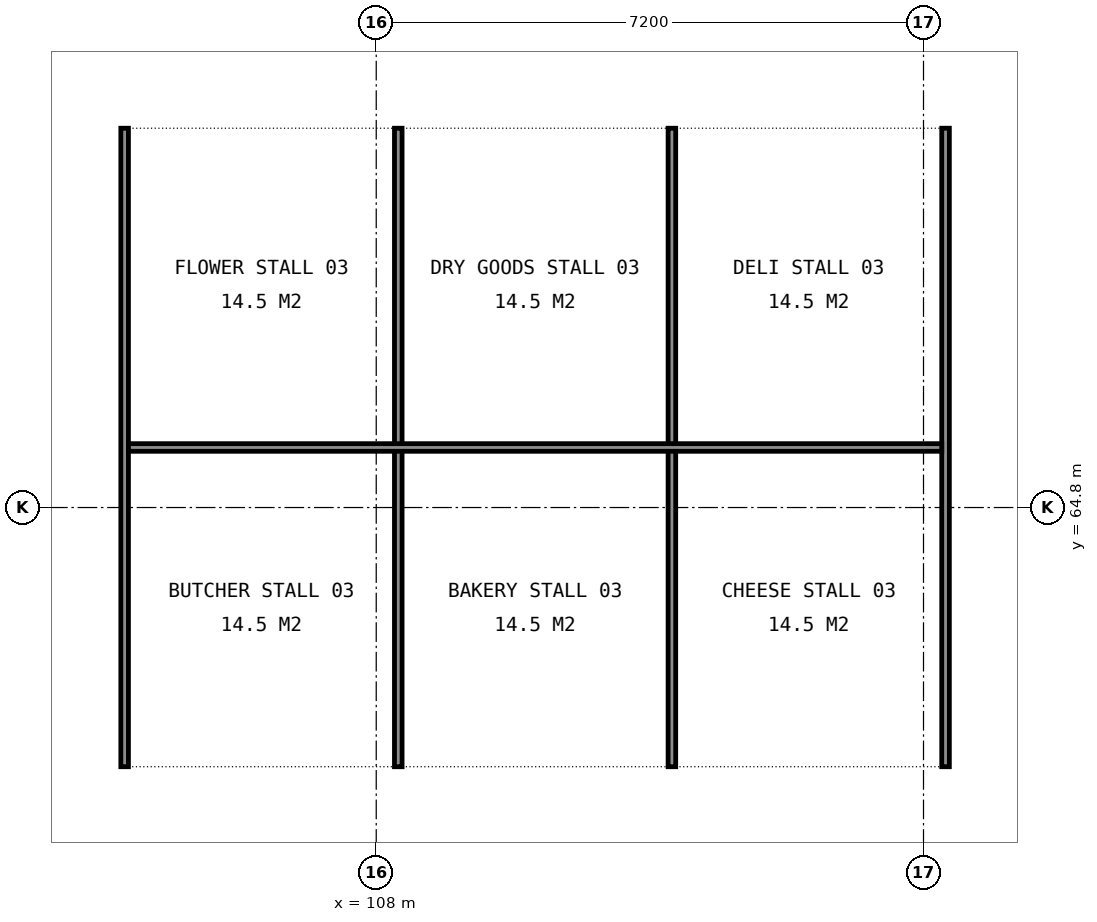
"""IFC4 building model, lengths in metres.
Left out: names, types, materials, properties, quantities, classifications, styles, units other than length and angle.
Written with IfcOpenShell. Run it as: python <this file> out.ifc"""

import sys

from ifc_helpers import new_model, si_unit, direction, frame, frame_2d, origin, place, context, subcontext, project, spatial, rectangle, extrude, element, save


model = new_model("IFC4")
c1 = context("Model", 3, precision=1e-05, world=origin(), true_north=direction((0.0, 1.0)))
c2 = subcontext(c1, "Body", "Model", "MODEL_VIEW")
j1 = project(units=[si_unit("LENGTHUNIT", "METRE"), si_unit("PLANEANGLEUNIT", "RADIAN")], contexts=[c1])
p1 = place(None, origin())
s1 = spatial("IfcSite", under=j1, at=p1, CompositionType="ELEMENT")
p2 = place(p1, origin())
s2 = spatial("IfcBuilding", under=s1, at=p2, CompositionType="ELEMENT")
p3 = place(p2, origin())
s3 = spatial("IfcBuildingStorey", under=s2, at=p3, CompositionType="ELEMENT", Elevation=0.0)
for number, where, z_axis, x_axis in (
    (1, (104.69, 61.39, 0.0), (0.0, 0.0, 1.0), (0.0, 1.0, 0.0)),
    (2, (108.29, 61.39, 0.0), (0.0, 0.0, 1.0), (0.0, 1.0, 0.0)),
    (3, (111.89, 61.39, 0.0), (0.0, 0.0, 1.0), (0.0, 1.0, 0.0)),
    (4, (115.49, 61.39, 0.0), (0.0, 0.0, 1.0), (0.0, 1.0, 0.0)),
):
    element("IfcWall", number, at=place(p3, frame(where, z_axis=z_axis, x_axis=x_axis)), inside=s3, PredefinedType="PARTITIONING", context=c2, shape_type="SweptSolid", body=[
        extrude(rectangle(XDim=8.4, YDim=0.1, at=frame_2d((4.2, 0.0))), origin(), (0.0, 0.0, 1.0), 1.2),
    ])
p4 = place(p3, frame((104.74, 65.59, 0.0), z_axis=(0.0, 0.0, 1.0), x_axis=(1.0, 0.0, 0.0)))
e5 = element("IfcWall", 5, at=p4, inside=s3, PredefinedType="PARTITIONING", context=c2, shape_type="SweptSolid", body=[
    extrude(rectangle(XDim=10.7, YDim=0.1, at=frame_2d((5.35, 0.0))), origin(), (0.0, 0.0, 1.0), 1.2),
])
save(model, sys.argv[1])
